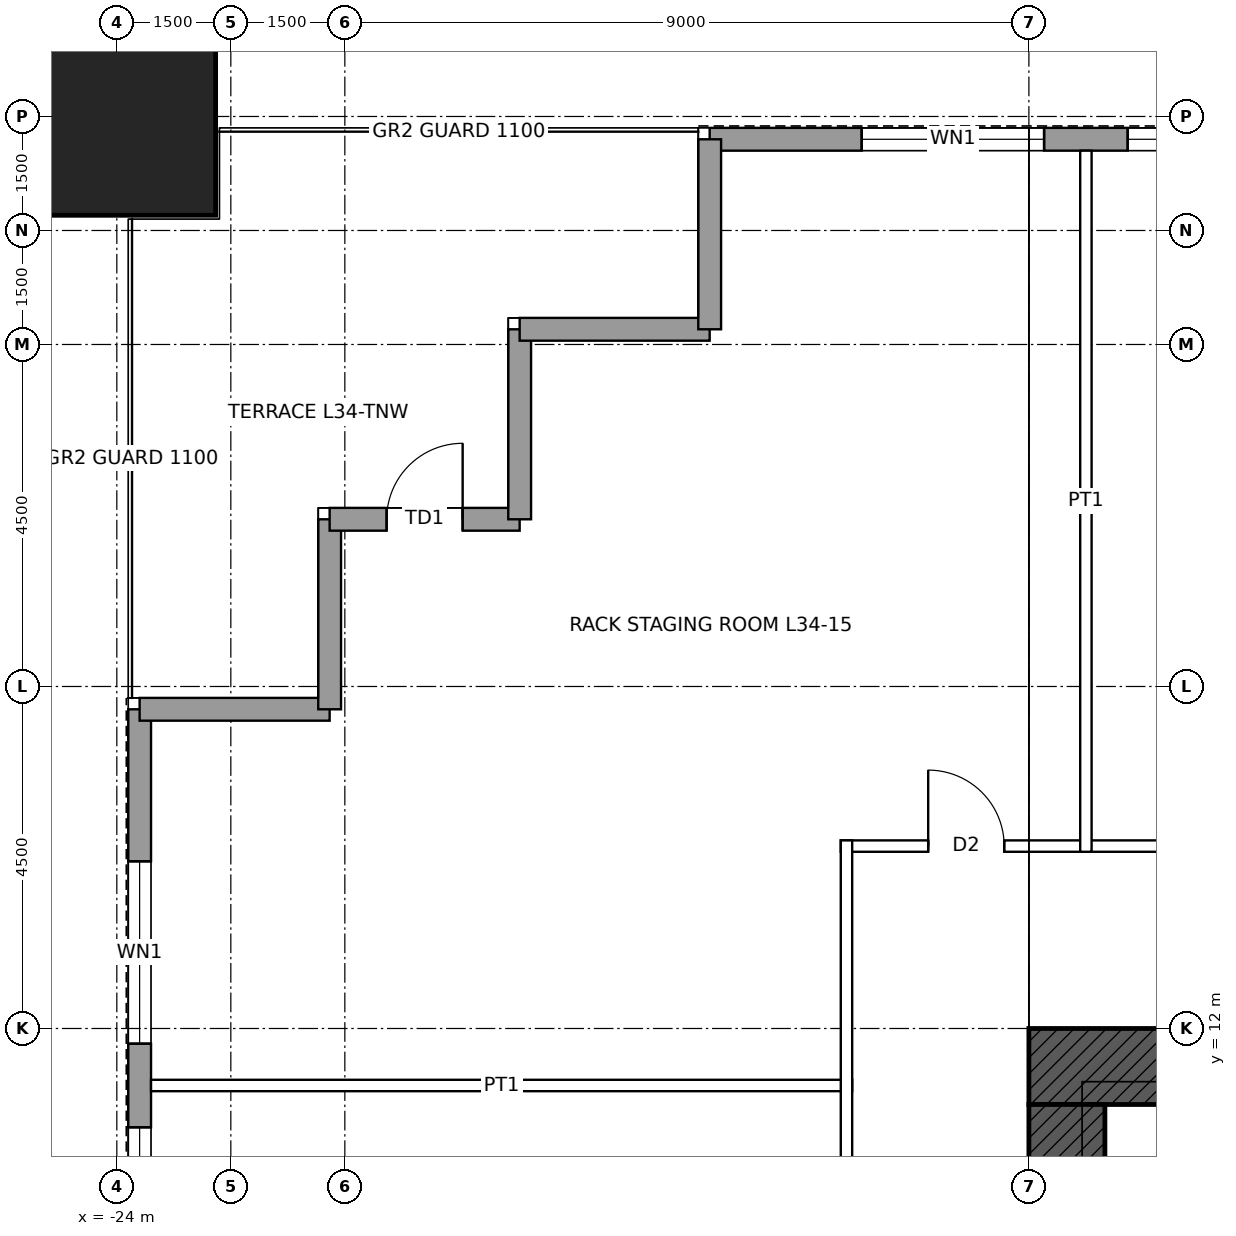
"""IFC4 building model, lengths in metres.
Left out: names, types, materials, properties, quantities, classifications, styles, units other than length and angle.
Written with IfcOpenShell. Run it as: python <this file> out.ifc"""

import sys

from ifc_helpers import new_model, si_unit, direction, frame, frame_2d, origin, origin_2d, place, context, subcontext, project, spatial, rectangle, hollow_rectangle, extrude, element, fill, save


model = new_model("IFC4")
c1 = context("Model", 3, precision=1e-05, world=origin(), true_north=direction((0.0, 1.0)))
c2 = subcontext(c1, "Body", "Model", "MODEL_VIEW")
j1 = project(units=[si_unit("LENGTHUNIT", "METRE"), si_unit("PLANEANGLEUNIT", "RADIAN")], contexts=[c1])
p1 = place(None, origin())
s1 = spatial("IfcSite", under=j1, at=p1, CompositionType="ELEMENT")
p2 = place(p1, origin())
s2 = spatial("IfcBuilding", under=s1, at=p2, CompositionType="ELEMENT")
p3 = place(p2, frame((0.0, 0.0, 167.4)))
s3 = spatial("IfcBuildingStorey", under=s2, at=p3, CompositionType="ELEMENT", Elevation=167.4)
p4 = place(p3, frame((-24.0, 24.0, 0.0), z_axis=(0.0, 0.0, 1.0), x_axis=(1.0, 0.0, 0.0)))
e1 = element("IfcColumn", 1, at=p4, inside=s3, PredefinedType="COLUMN", context=c2, shape_type="SweptSolid", body=[
    extrude(hollow_rectangle(XDim=2.6, YDim=2.6, WallThickness=0.13, at=origin_2d()), origin(), (0.0, 0.0, 1.0), 4.5),
])
p5 = place(p3, frame((-12.0, 11.5, 0.0), z_axis=(0.0, 0.0, 1.0), x_axis=(1.0, 0.0, 0.0)))
e2 = element("IfcWall", 2, at=p5, inside=s3, PredefinedType="SHEAR", context=c2, shape_type="SweptSolid", body=[
    extrude(rectangle(XDim=24.0, YDim=1.0, at=frame_2d((12.0, 0.0))), origin(), (0.0, 0.0, 1.0), 4.5),
])
p6 = place(p5, frame((6.25, 0.0, 0.0)))
e3 = element("IfcOpeningElement", 3, at=p6, cuts=e2, PredefinedType="OPENING", context=c2, shape_type="SweptSolid", body=[
    extrude(rectangle(XDim=1.0, YDim=2.4, at=frame_2d((0.5, 1.2))), frame((0.0, 0.51, 0.0), z_axis=(0.0, -1.0, 0.0), x_axis=(1.0, 0.0, 0.0)), (0.0, 0.0, 1.0), 1.02),
])
p7 = place(p5, frame((16.75, 0.0, 0.0)))
e4 = element("IfcOpeningElement", 4, at=p7, cuts=e2, PredefinedType="OPENING", context=c2, shape_type="SweptSolid", body=[
    extrude(rectangle(XDim=1.0, YDim=2.4, at=frame_2d((0.5, 1.2))), frame((0.0, 0.51, 0.0), z_axis=(0.0, -1.0, 0.0), x_axis=(1.0, 0.0, 0.0)), (0.0, 0.0, 1.0), 1.02),
])
p8 = place(p3, frame((-11.5, -11.0, 0.0), z_axis=(0.0, 0.0, 1.0), x_axis=(0.0, 1.0, 0.0)))
e5 = element("IfcWall", 5, at=p8, inside=s3, PredefinedType="SHEAR", context=c2, shape_type="SweptSolid", body=[
    extrude(rectangle(XDim=22.0, YDim=1.0, at=frame_2d((11.0, 0.0))), origin(), (0.0, 0.0, 1.0), 4.5),
])
p9 = place(p8, frame((10.5, 0.0, 0.0)))
e6 = element("IfcOpeningElement", 6, at=p9, cuts=e5, PredefinedType="OPENING", context=c2, shape_type="SweptSolid", body=[
    extrude(rectangle(XDim=1.0, YDim=2.4, at=frame_2d((0.5, 1.2))), frame((0.0, 0.51, 0.0), z_axis=(0.0, -1.0, 0.0), x_axis=(1.0, 0.0, 0.0)), (0.0, 0.0, 1.0), 1.02),
])
p10 = place(p3, frame((-16.2, 23.7, 0.0), z_axis=(0.0, 0.0, 1.0), x_axis=(1.0, 0.0, 0.0)))
e7 = element("IfcWall", 7, at=p10, inside=s3, PredefinedType="SOLIDWALL", context=c2, shape_type="SweptSolid", body=[
    extrude(rectangle(XDim=32.4, YDim=0.3, at=frame_2d((16.2, 0.0))), origin(), (0.0, 0.0, 1.0), 4.25),
])
p11 = place(p10, frame((2.0, 0.0, 1.0)))
e8 = element("IfcOpeningElement", 8, at=p11, cuts=e7, PredefinedType="OPENING", context=c2, shape_type="SweptSolid", body=[
    extrude(rectangle(XDim=2.4, YDim=1.2, at=frame_2d((1.2, 0.6))), frame((0.0, 0.16, 0.0), z_axis=(0.0, -1.0, 0.0), x_axis=(1.0, 0.0, 0.0)), (0.0, 0.0, 1.0), 0.32),
])
p12 = place(p10, frame((5.5, 0.0, 1.0)))
e9 = element("IfcOpeningElement", 9, at=p12, cuts=e7, PredefinedType="OPENING", context=c2, shape_type="SweptSolid", body=[
    extrude(rectangle(XDim=2.4, YDim=1.2, at=frame_2d((1.2, 0.6))), frame((0.0, 0.16, 0.0), z_axis=(0.0, -1.0, 0.0), x_axis=(1.0, 0.0, 0.0)), (0.0, 0.0, 1.0), 0.32),
])
p13 = place(p10, frame((9.5, 0.0, 1.0)))
e10 = element("IfcOpeningElement", 10, at=p13, cuts=e7, PredefinedType="OPENING", context=c2, shape_type="SweptSolid", body=[
    extrude(rectangle(XDim=2.4, YDim=1.2, at=frame_2d((1.2, 0.6))), frame((0.0, 0.16, 0.0), z_axis=(0.0, -1.0, 0.0), x_axis=(1.0, 0.0, 0.0)), (0.0, 0.0, 1.0), 0.32),
])
p14 = place(p10, frame((13.0, 0.0, 1.0)))
e11 = element("IfcOpeningElement", 11, at=p14, cuts=e7, PredefinedType="OPENING", context=c2, shape_type="SweptSolid", body=[
    extrude(rectangle(XDim=2.4, YDim=1.2, at=frame_2d((1.2, 0.6))), frame((0.0, 0.16, 0.0), z_axis=(0.0, -1.0, 0.0), x_axis=(1.0, 0.0, 0.0)), (0.0, 0.0, 1.0), 0.32),
])
p15 = place(p10, frame((17.0, 0.0, 1.0)))
e12 = element("IfcOpeningElement", 12, at=p15, cuts=e7, PredefinedType="OPENING", context=c2, shape_type="SweptSolid", body=[
    extrude(rectangle(XDim=2.4, YDim=1.2, at=frame_2d((1.2, 0.6))), frame((0.0, 0.16, 0.0), z_axis=(0.0, -1.0, 0.0), x_axis=(1.0, 0.0, 0.0)), (0.0, 0.0, 1.0), 0.32),
])
p16 = place(p10, frame((20.5, 0.0, 1.0)))
e13 = element("IfcOpeningElement", 13, at=p16, cuts=e7, PredefinedType="OPENING", context=c2, shape_type="SweptSolid", body=[
    extrude(rectangle(XDim=2.4, YDim=1.2, at=frame_2d((1.2, 0.6))), frame((0.0, 0.16, 0.0), z_axis=(0.0, -1.0, 0.0), x_axis=(1.0, 0.0, 0.0)), (0.0, 0.0, 1.0), 0.32),
])
p17 = place(p10, frame((24.5, 0.0, 1.0)))
e14 = element("IfcOpeningElement", 14, at=p17, cuts=e7, PredefinedType="OPENING", context=c2, shape_type="SweptSolid", body=[
    extrude(rectangle(XDim=2.4, YDim=1.2, at=frame_2d((1.2, 0.6))), frame((0.0, 0.16, 0.0), z_axis=(0.0, -1.0, 0.0), x_axis=(1.0, 0.0, 0.0)), (0.0, 0.0, 1.0), 0.32),
])
p18 = place(p10, frame((28.0, 0.0, 1.0)))
e15 = element("IfcOpeningElement", 15, at=p18, cuts=e7, PredefinedType="OPENING", context=c2, shape_type="SweptSolid", body=[
    extrude(rectangle(XDim=2.4, YDim=1.2, at=frame_2d((1.2, 0.6))), frame((0.0, 0.16, 0.0), z_axis=(0.0, -1.0, 0.0), x_axis=(1.0, 0.0, 0.0)), (0.0, 0.0, 1.0), 0.32),
])
p19 = place(p3, frame((-23.7, -16.2, 0.0), z_axis=(0.0, 0.0, 1.0), x_axis=(0.0, 1.0, 0.0)))
e16 = element("IfcWall", 16, at=p19, inside=s3, PredefinedType="SOLIDWALL", context=c2, shape_type="SweptSolid", body=[
    extrude(rectangle(XDim=32.4, YDim=0.3, at=frame_2d((16.2, 0.0))), origin(), (0.0, 0.0, 1.0), 4.25),
])
p20 = place(p19, frame((2.0, 0.0, 1.0)))
e17 = element("IfcOpeningElement", 17, at=p20, cuts=e16, PredefinedType="OPENING", context=c2, shape_type="SweptSolid", body=[
    extrude(rectangle(XDim=2.4, YDim=1.2, at=frame_2d((1.2, 0.6))), frame((0.0, 0.16, 0.0), z_axis=(0.0, -1.0, 0.0), x_axis=(1.0, 0.0, 0.0)), (0.0, 0.0, 1.0), 0.32),
])
p21 = place(p19, frame((5.5, 0.0, 1.0)))
e18 = element("IfcOpeningElement", 18, at=p21, cuts=e16, PredefinedType="OPENING", context=c2, shape_type="SweptSolid", body=[
    extrude(rectangle(XDim=2.4, YDim=1.2, at=frame_2d((1.2, 0.6))), frame((0.0, 0.16, 0.0), z_axis=(0.0, -1.0, 0.0), x_axis=(1.0, 0.0, 0.0)), (0.0, 0.0, 1.0), 0.32),
])
p22 = place(p19, frame((9.5, 0.0, 1.0)))
e19 = element("IfcOpeningElement", 19, at=p22, cuts=e16, PredefinedType="OPENING", context=c2, shape_type="SweptSolid", body=[
    extrude(rectangle(XDim=2.4, YDim=1.2, at=frame_2d((1.2, 0.6))), frame((0.0, 0.16, 0.0), z_axis=(0.0, -1.0, 0.0), x_axis=(1.0, 0.0, 0.0)), (0.0, 0.0, 1.0), 0.32),
])
p23 = place(p19, frame((13.0, 0.0, 1.0)))
e20 = element("IfcOpeningElement", 20, at=p23, cuts=e16, PredefinedType="OPENING", context=c2, shape_type="SweptSolid", body=[
    extrude(rectangle(XDim=2.4, YDim=1.2, at=frame_2d((1.2, 0.6))), frame((0.0, 0.16, 0.0), z_axis=(0.0, -1.0, 0.0), x_axis=(1.0, 0.0, 0.0)), (0.0, 0.0, 1.0), 0.32),
])
p24 = place(p19, frame((17.0, 0.0, 1.0)))
e21 = element("IfcOpeningElement", 21, at=p24, cuts=e16, PredefinedType="OPENING", context=c2, shape_type="SweptSolid", body=[
    extrude(rectangle(XDim=2.4, YDim=1.2, at=frame_2d((1.2, 0.6))), frame((0.0, 0.16, 0.0), z_axis=(0.0, -1.0, 0.0), x_axis=(1.0, 0.0, 0.0)), (0.0, 0.0, 1.0), 0.32),
])
p25 = place(p19, frame((20.5, 0.0, 1.0)))
e22 = element("IfcOpeningElement", 22, at=p25, cuts=e16, PredefinedType="OPENING", context=c2, shape_type="SweptSolid", body=[
    extrude(rectangle(XDim=2.4, YDim=1.2, at=frame_2d((1.2, 0.6))), frame((0.0, 0.16, 0.0), z_axis=(0.0, -1.0, 0.0), x_axis=(1.0, 0.0, 0.0)), (0.0, 0.0, 1.0), 0.32),
])
p26 = place(p19, frame((24.5, 0.0, 1.0)))
e23 = element("IfcOpeningElement", 23, at=p26, cuts=e16, PredefinedType="OPENING", context=c2, shape_type="SweptSolid", body=[
    extrude(rectangle(XDim=2.4, YDim=1.2, at=frame_2d((1.2, 0.6))), frame((0.0, 0.16, 0.0), z_axis=(0.0, -1.0, 0.0), x_axis=(1.0, 0.0, 0.0)), (0.0, 0.0, 1.0), 0.32),
])
p27 = place(p19, frame((28.0, 0.0, 1.0)))
e24 = element("IfcOpeningElement", 24, at=p27, cuts=e16, PredefinedType="OPENING", context=c2, shape_type="SweptSolid", body=[
    extrude(rectangle(XDim=2.4, YDim=1.2, at=frame_2d((1.2, 0.6))), frame((0.0, 0.16, 0.0), z_axis=(0.0, -1.0, 0.0), x_axis=(1.0, 0.0, 0.0)), (0.0, 0.0, 1.0), 0.32),
])
for number, where, z_axis, x_axis in (
    (25, (-23.7, 16.2, 0.0), (0.0, 0.0, 1.0), (1.0, 0.0, 0.0)),
    (26, (-21.2, 16.2, 0.0), (0.0, 0.0, 1.0), (0.0, 1.0, 0.0)),
):
    element("IfcWall", number, at=place(p3, frame(where, z_axis=z_axis, x_axis=x_axis)), inside=s3, PredefinedType="SOLIDWALL", context=c2, shape_type="SweptSolid", body=[
        extrude(rectangle(XDim=2.5, YDim=0.3, at=frame_2d((1.25, 0.0))), origin(), (0.0, 0.0, 1.0), 4.25),
    ])
p28 = place(p3, frame((-21.2, 18.7, 0.0), z_axis=(0.0, 0.0, 1.0), x_axis=(1.0, 0.0, 0.0)))
e27 = element("IfcWall", 27, at=p28, inside=s3, PredefinedType="SOLIDWALL", context=c2, shape_type="SweptSolid", body=[
    extrude(rectangle(XDim=2.5, YDim=0.3, at=frame_2d((1.25, 0.0))), origin(), (0.0, 0.0, 1.0), 4.25),
])
p29 = place(p28, frame((0.75, 0.0, 0.0)))
e28 = element("IfcOpeningElement", 28, at=p29, cuts=e27, PredefinedType="OPENING", context=c2, shape_type="SweptSolid", body=[
    extrude(rectangle(XDim=1.0, YDim=2.4, at=frame_2d((0.5, 1.2))), frame((0.0, 0.16, 0.0), z_axis=(0.0, -1.0, 0.0), x_axis=(1.0, 0.0, 0.0)), (0.0, 0.0, 1.0), 0.32),
])
for number, where, z_axis, x_axis in (
    (29, (-18.7, 18.7, 0.0), (0.0, 0.0, 1.0), (0.0, 1.0, 0.0)),
    (30, (-18.7, 21.2, 0.0), (0.0, 0.0, 1.0), (1.0, 0.0, 0.0)),
    (31, (-16.2, 21.2, 0.0), (0.0, 0.0, 1.0), (0.0, 1.0, 0.0)),
):
    element("IfcWall", number, at=place(p3, frame(where, z_axis=z_axis, x_axis=x_axis)), inside=s3, PredefinedType="SOLIDWALL", context=c2, shape_type="SweptSolid", body=[
        extrude(rectangle(XDim=2.5, YDim=0.3, at=frame_2d((1.25, 0.0))), origin(), (0.0, 0.0, 1.0), 4.25),
    ])
p30 = place(p3, frame((-23.55, 11.25, 0.0), z_axis=(0.0, 0.0, 1.0), x_axis=(1.0, 0.0, 0.0)))
e32 = element("IfcWall", 32, at=p30, inside=s3, PredefinedType="PARTITIONING", context=c2, shape_type="SweptSolid", body=[
    extrude(rectangle(XDim=9.225, YDim=0.15, at=frame_2d((4.613, 0.0))), origin(), (0.0, 0.0, 1.0), 3.409),
])
p31 = place(p3, frame((-14.475, 14.4, 0.0), z_axis=(0.0, 0.0, 1.0), x_axis=(1.0, 0.0, 0.0)))
e33 = element("IfcWall", 33, at=p31, inside=s3, PredefinedType="PARTITIONING", context=c2, shape_type="SweptSolid", body=[
    extrude(rectangle(XDim=18.3, YDim=0.15, at=frame_2d((9.15, 0.0))), origin(), (0.0, 0.0, 1.0), 4.25),
])
p32 = place(p31, frame((10.225, 0.0, 0.0)))
e34 = element("IfcOpeningElement", 34, at=p32, cuts=e33, PredefinedType="OPENING", context=c2, shape_type="SweptSolid", body=[
    extrude(rectangle(XDim=1.0, YDim=2.4, at=frame_2d((0.5, 1.2))), frame((0.0, 0.085, 0.0), z_axis=(0.0, -1.0, 0.0), x_axis=(1.0, 0.0, 0.0)), (0.0, 0.0, 1.0), 0.17),
])
p33 = place(p31, frame((1.15, 0.0, 0.0)))
e35 = element("IfcOpeningElement", 35, at=p33, cuts=e33, PredefinedType="OPENING", context=c2, shape_type="SweptSolid", body=[
    extrude(rectangle(XDim=1.0, YDim=2.1, at=frame_2d((0.5, 1.05))), frame((0.0, 0.085, 0.0), z_axis=(0.0, -1.0, 0.0), x_axis=(1.0, 0.0, 0.0)), (0.0, 0.0, 1.0), 0.17),
])
p34 = place(p3, frame((-14.4, -14.475, 0.0), z_axis=(0.0, 0.0, 1.0), x_axis=(0.0, 1.0, 0.0)))
e36 = element("IfcWall", 36, at=p34, inside=s3, PredefinedType="PARTITIONING", context=c2, shape_type="SweptSolid", body=[
    extrude(rectangle(XDim=28.95, YDim=0.15, at=frame_2d((14.475, 0.0))), origin(), (0.0, 0.0, 1.0), 4.25),
])
p35 = place(p34, frame((6.075, 0.0, 0.0)))
e37 = element("IfcOpeningElement", 37, at=p35, cuts=e36, PredefinedType="OPENING", context=c2, shape_type="SweptSolid", body=[
    extrude(rectangle(XDim=1.8, YDim=2.4, at=frame_2d((0.9, 1.2))), frame((0.0, 0.085, 0.0), z_axis=(0.0, -1.0, 0.0), x_axis=(1.0, 0.0, 0.0)), (0.0, 0.0, 1.0), 0.17),
])
p36 = place(p34, frame((13.975, 0.0, 0.0)))
e38 = element("IfcOpeningElement", 38, at=p36, cuts=e36, PredefinedType="OPENING", context=c2, shape_type="SweptSolid", body=[
    extrude(rectangle(XDim=1.0, YDim=2.1, at=frame_2d((0.5, 1.05))), frame((0.0, 0.085, 0.0), z_axis=(0.0, -1.0, 0.0), x_axis=(1.0, 0.0, 0.0)), (0.0, 0.0, 1.0), 0.17),
])
p37 = place(p34, frame((21.475, 0.0, 0.0)))
e39 = element("IfcOpeningElement", 39, at=p37, cuts=e36, PredefinedType="OPENING", context=c2, shape_type="SweptSolid", body=[
    extrude(rectangle(XDim=1.0, YDim=2.1, at=frame_2d((0.5, 1.05))), frame((0.0, 0.085, 0.0), z_axis=(0.0, -1.0, 0.0), x_axis=(1.0, 0.0, 0.0)), (0.0, 0.0, 1.0), 0.17),
])
p38 = place(p3, frame((-11.25, 14.325, 0.0), z_axis=(0.0, 0.0, 1.0), x_axis=(0.0, 1.0, 0.0)))
e40 = element("IfcWall", 40, at=p38, inside=s3, PredefinedType="PARTITIONING", context=c2, shape_type="SweptSolid", body=[
    extrude(rectangle(XDim=9.225, YDim=0.15, at=frame_2d((4.613, 0.0))), origin(), (0.0, 0.0, 1.0), 3.409),
])
p39 = place(p11, origin())
e41 = element("IfcWindow", 41, at=p39, inside=s3, PartitioningType="SINGLE_PANEL", PredefinedType="WINDOW", context=c2, shape_type="SweptSolid", body=[
    extrude(rectangle(XDim=2.4, YDim=1.2, at=frame_2d((1.2, 0.6))), frame((0.0, 0.03, 0.0), z_axis=(0.0, -1.0, 0.0), x_axis=(1.0, 0.0, 0.0)), (0.0, 0.0, 1.0), 0.06),
])
fill(e8, e41)
p40 = place(p12, origin())
e42 = element("IfcWindow", 42, at=p40, inside=s3, PartitioningType="SINGLE_PANEL", PredefinedType="WINDOW", context=c2, shape_type="SweptSolid", body=[
    extrude(rectangle(XDim=2.4, YDim=1.2, at=frame_2d((1.2, 0.6))), frame((0.0, 0.03, 0.0), z_axis=(0.0, -1.0, 0.0), x_axis=(1.0, 0.0, 0.0)), (0.0, 0.0, 1.0), 0.06),
])
fill(e9, e42)
p41 = place(p26, origin())
e43 = element("IfcWindow", 43, at=p41, inside=s3, PartitioningType="SINGLE_PANEL", PredefinedType="WINDOW", context=c2, shape_type="SweptSolid", body=[
    extrude(rectangle(XDim=2.4, YDim=1.2, at=frame_2d((1.2, 0.6))), frame((0.0, 0.03, 0.0), z_axis=(0.0, -1.0, 0.0), x_axis=(1.0, 0.0, 0.0)), (0.0, 0.0, 1.0), 0.06),
])
fill(e23, e43)
p42 = place(p27, origin())
e44 = element("IfcWindow", 44, at=p42, inside=s3, PartitioningType="SINGLE_PANEL", PredefinedType="WINDOW", context=c2, shape_type="SweptSolid", body=[
    extrude(rectangle(XDim=2.4, YDim=1.2, at=frame_2d((1.2, 0.6))), frame((0.0, 0.03, 0.0), z_axis=(0.0, -1.0, 0.0), x_axis=(1.0, 0.0, 0.0)), (0.0, 0.0, 1.0), 0.06),
])
fill(e24, e44)
p43 = place(p29, origin())
e45 = element("IfcDoor", 45, at=p43, inside=s3, OperationType="SINGLE_SWING_RIGHT", PredefinedType="DOOR", context=c2, shape_type="SweptSolid", body=[
    extrude(rectangle(XDim=1.0, YDim=2.4, at=frame_2d((0.5, 1.2))), frame((0.0, 0.025, 0.0), z_axis=(0.0, -1.0, 0.0), x_axis=(1.0, 0.0, 0.0)), (0.0, 0.0, 1.0), 0.05),
])
fill(e28, e45)
p44 = place(p33, origin())
e46 = element("IfcDoor", 46, at=p44, inside=s3, OperationType="SINGLE_SWING_LEFT", PredefinedType="DOOR", context=c2, shape_type="SweptSolid", body=[
    extrude(rectangle(XDim=1.0, YDim=2.1, at=frame_2d((0.5, 1.05))), frame((0.0, 0.025, 0.0), z_axis=(0.0, -1.0, 0.0), x_axis=(1.0, 0.0, 0.0)), (0.0, 0.0, 1.0), 0.05),
])
fill(e35, e46)
save(model, sys.argv[1])
